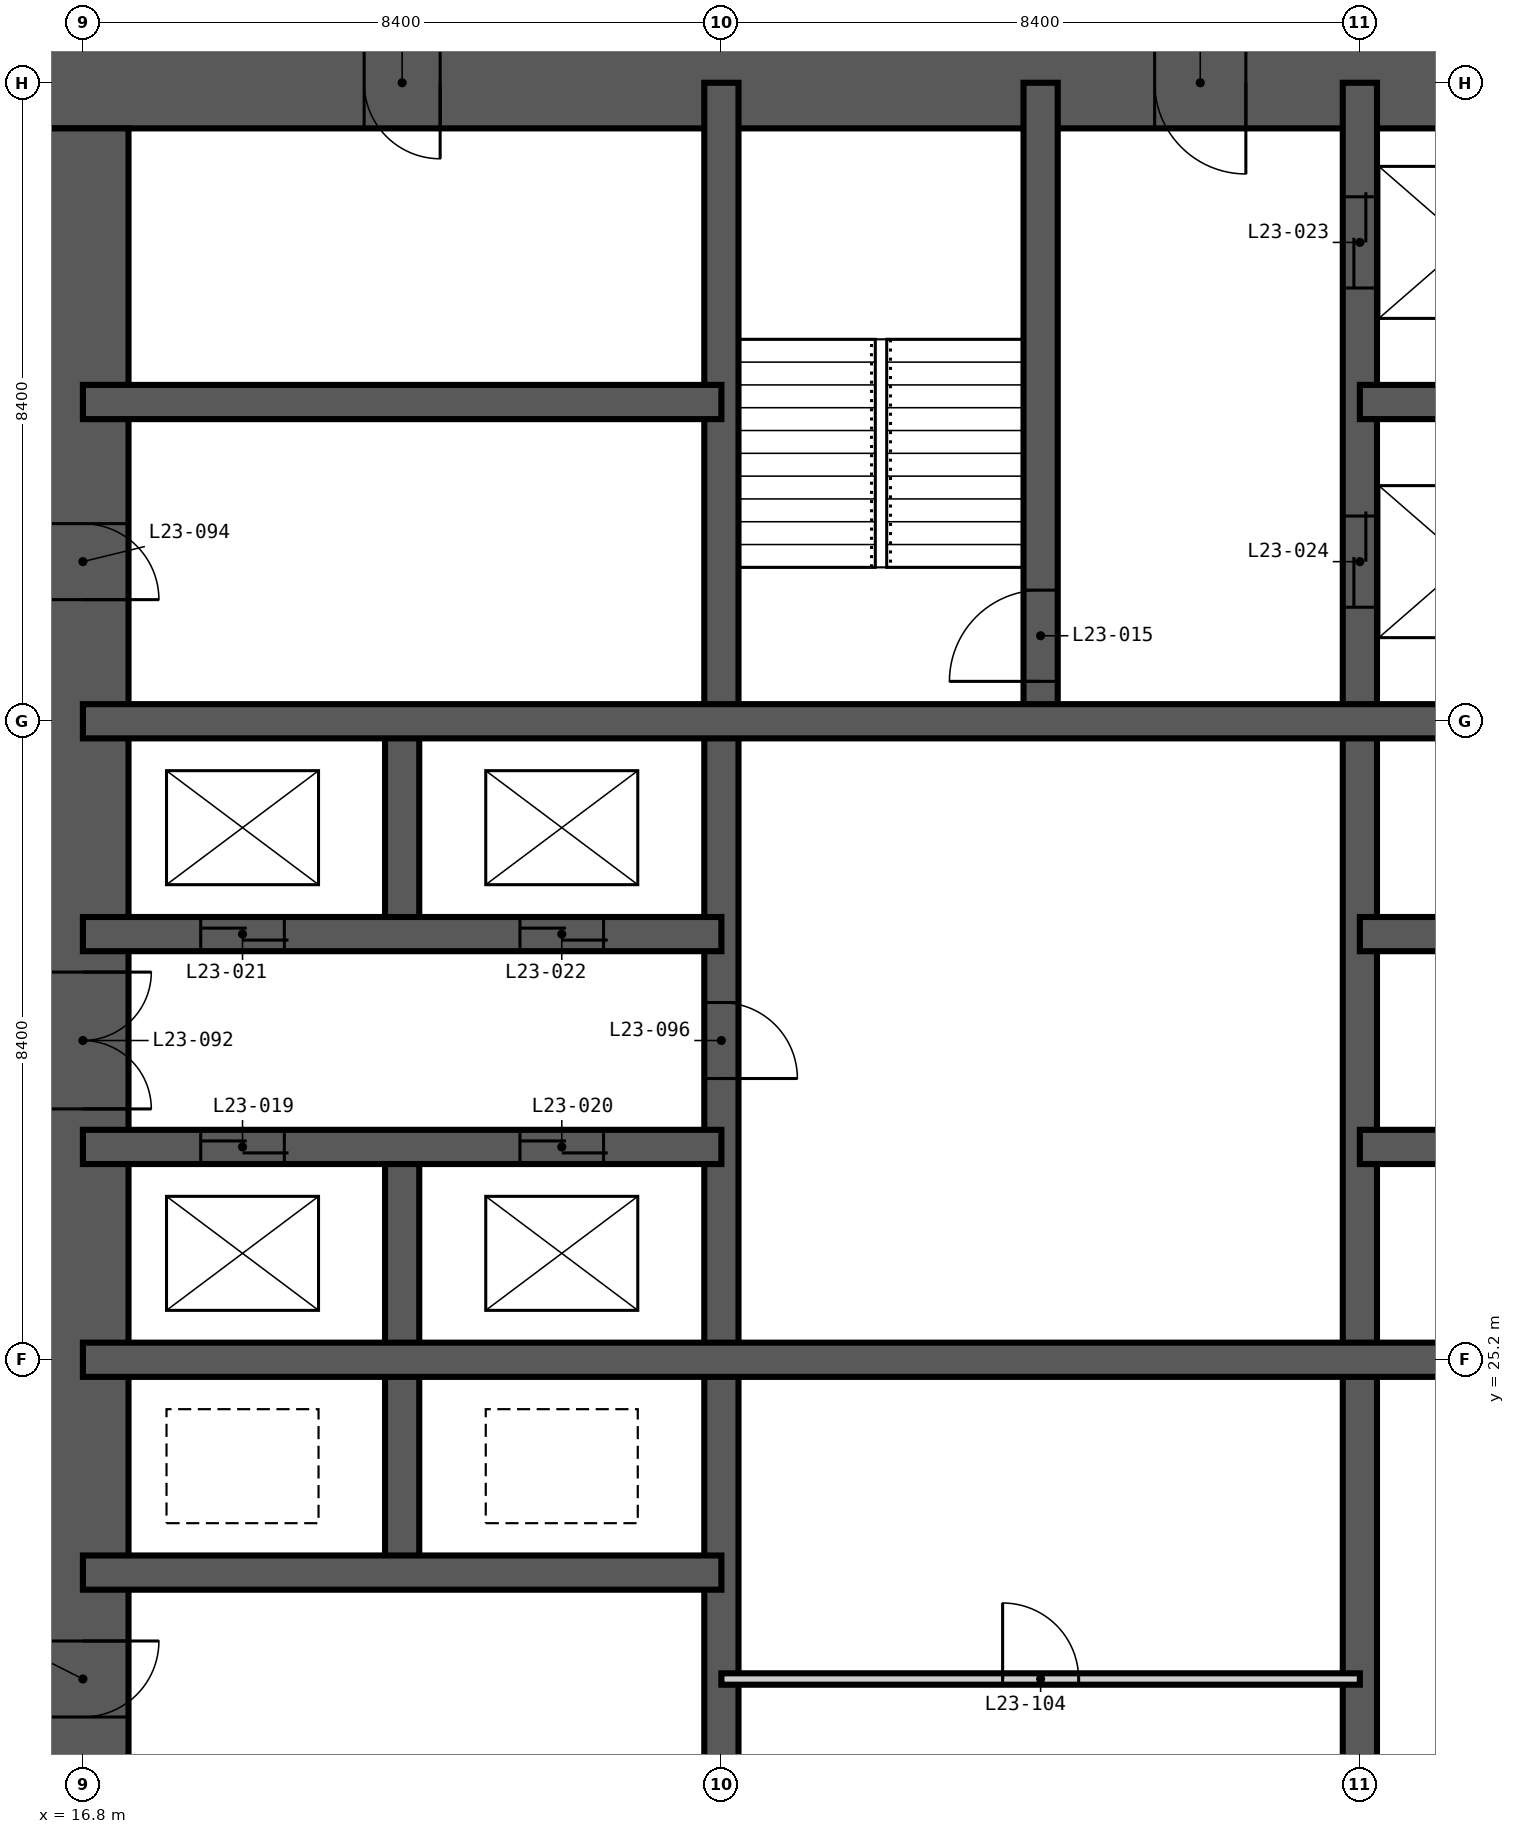
"""IFC4 building model, lengths in metres.
Left out: names, types, materials, properties, quantities, classifications, styles, units other than length and angle.
Written with IfcOpenShell. Run it as: python <this file> out.ifc"""

import sys

from ifc_helpers import new_model, si_unit, direction, frame, frame_2d, origin, place, context, subcontext, project, spatial, rectangle, extrude, element, fill, save


model = new_model("IFC4")
c1 = context("Model", 3, precision=1e-05, world=origin(), true_north=direction((0.0, 1.0)))
c2 = subcontext(c1, "Body", "Model", "MODEL_VIEW")
j1 = project(units=[si_unit("LENGTHUNIT", "METRE"), si_unit("PLANEANGLEUNIT", "RADIAN")], contexts=[c1])
p1 = place(None, origin())
s1 = spatial("IfcSite", under=j1, at=p1, CompositionType="ELEMENT")
p2 = place(p1, origin())
s2 = spatial("IfcBuilding", under=s1, at=p2, CompositionType="ELEMENT")
p3 = place(p2, frame((0.0, 0.0, 93.6)))
s3 = spatial("IfcBuildingStorey", under=s2, at=p3, CompositionType="ELEMENT", Elevation=93.6)
p4 = place(p3, frame((42.6, 42.0, -0.35), z_axis=(0.0, 0.0, 1.0), x_axis=(-1.0, 0.0, 0.0)))
e1 = element("IfcWall", 1, at=p4, inside=s3, PredefinedType="SHEAR", context=c2, shape_type="SweptSolid", body=[
    extrude(rectangle(XDim=26.4, YDim=1.2, at=frame_2d((13.2, 0.0))), origin(), (0.0, 0.0, 1.0), 3.6),
])
p5 = place(p4, frame((21.1, 0.0, 0.35)))
e2 = element("IfcOpeningElement", 2, at=p5, cuts=e1, PredefinedType="OPENING", context=c2, shape_type="SweptSolid", body=[
    extrude(rectangle(XDim=1.0, YDim=2.1, at=frame_2d((0.5, 1.05))), frame((0.0, 0.61, 0.0), z_axis=(0.0, -1.0, 0.0), x_axis=(1.0, 0.0, 0.0)), (0.0, 0.0, 1.0), 1.22),
])
p6 = place(p4, frame((10.5, 0.0, 0.35)))
e3 = element("IfcOpeningElement", 3, at=p6, cuts=e1, PredefinedType="OPENING", context=c2, shape_type="SweptSolid", body=[
    extrude(rectangle(XDim=1.2, YDim=2.2, at=frame_2d((0.6, 1.1))), frame((0.0, 0.61, 0.0), z_axis=(0.0, -1.0, 0.0), x_axis=(1.0, 0.0, 0.0)), (0.0, 0.0, 1.0), 1.22),
])
p7 = place(p3, frame((16.8, 41.4, -0.35), z_axis=(0.0, 0.0, 1.0), x_axis=(0.0, -1.0, 0.0)))
e4 = element("IfcWall", 4, at=p7, inside=s3, PredefinedType="SHEAR", context=c2, shape_type="SweptSolid", body=[
    extrude(rectangle(XDim=24.0, YDim=1.2, at=frame_2d((12.0, 0.0))), origin(), (0.0, 0.0, 1.0), 3.6),
])
p8 = place(p7, frame((11.1, 0.0, 0.35)))
e5 = element("IfcOpeningElement", 5, at=p8, cuts=e4, PredefinedType="OPENING", context=c2, shape_type="SweptSolid", body=[
    extrude(rectangle(XDim=1.8, YDim=2.2, at=frame_2d((0.9, 1.1))), frame((0.0, 0.61, 0.0), z_axis=(0.0, -1.0, 0.0), x_axis=(1.0, 0.0, 0.0)), (0.0, 0.0, 1.0), 1.22),
])
p9 = place(p7, frame((19.9, 0.0, 0.35)))
e6 = element("IfcOpeningElement", 6, at=p9, cuts=e4, PredefinedType="OPENING", context=c2, shape_type="SweptSolid", body=[
    extrude(rectangle(XDim=1.0, YDim=2.1, at=frame_2d((0.5, 1.05))), frame((0.0, 0.61, 0.0), z_axis=(0.0, -1.0, 0.0), x_axis=(1.0, 0.0, 0.0)), (0.0, 0.0, 1.0), 1.22),
])
p10 = place(p7, frame((5.2, 0.0, 0.35)))
e7 = element("IfcOpeningElement", 7, at=p10, cuts=e4, PredefinedType="OPENING", context=c2, shape_type="SweptSolid", body=[
    extrude(rectangle(XDim=1.0, YDim=2.1, at=frame_2d((0.5, 1.05))), frame((0.0, 0.61, 0.0), z_axis=(0.0, -1.0, 0.0), x_axis=(1.0, 0.0, 0.0)), (0.0, 0.0, 1.0), 1.22),
])
p11 = place(p3, frame((21.0, 22.4, -0.35), z_axis=(0.0, 0.0, 1.0), x_axis=(0.0, 1.0, 0.0)))
e8 = element("IfcWall", 8, at=p11, inside=s3, PredefinedType="SHEAR", context=c2, shape_type="SweptSolid", body=[
    extrude(rectangle(XDim=5.6, YDim=0.45, at=frame_2d((2.8, 0.0))), origin(), (0.0, 0.0, 1.0), 3.6),
])
p12 = place(p3, frame((21.0, 30.8, -0.35), z_axis=(0.0, 0.0, 1.0), x_axis=(0.0, 1.0, 0.0)))
e9 = element("IfcWall", 9, at=p12, inside=s3, PredefinedType="SHEAR", context=c2, shape_type="SweptSolid", body=[
    extrude(rectangle(XDim=2.8, YDim=0.45, at=frame_2d((1.4, 0.0))), origin(), (0.0, 0.0, 1.0), 3.6),
])
p13 = place(p3, frame((25.2, 16.8, -0.35), z_axis=(0.0, 0.0, 1.0), x_axis=(0.0, 1.0, 0.0)))
e10 = element("IfcWall", 10, at=p13, inside=s3, PredefinedType="SHEAR", context=c2, shape_type="SweptSolid", body=[
    extrude(rectangle(XDim=25.2, YDim=0.45, at=frame_2d((12.6, 0.0))), origin(), (0.0, 0.0, 1.0), 3.6),
])
p14 = place(p13, frame((12.1, 0.0, 0.35)))
e11 = element("IfcOpeningElement", 11, at=p14, cuts=e10, PredefinedType="OPENING", context=c2, shape_type="SweptSolid", body=[
    extrude(rectangle(XDim=1.0, YDim=2.1, at=frame_2d((0.5, 1.05))), frame((0.0, 0.235, 0.0), z_axis=(0.0, -1.0, 0.0), x_axis=(1.0, 0.0, 0.0)), (0.0, 0.0, 1.0), 0.47),
])
p15 = place(p3, frame((29.4, 33.6, -0.35), z_axis=(0.0, 0.0, 1.0), x_axis=(0.0, 1.0, 0.0)))
e12 = element("IfcWall", 12, at=p15, inside=s3, PredefinedType="SHEAR", context=c2, shape_type="SweptSolid", body=[
    extrude(rectangle(XDim=8.4, YDim=0.45, at=frame_2d((4.2, 0.0))), origin(), (0.0, 0.0, 1.0), 3.6),
])
p16 = place(p15, frame((0.525, 0.0, 0.35)))
e13 = element("IfcOpeningElement", 13, at=p16, cuts=e12, PredefinedType="OPENING", context=c2, shape_type="SweptSolid", body=[
    extrude(rectangle(XDim=1.2, YDim=2.2, at=frame_2d((0.6, 1.1))), frame((0.0, 0.235, 0.0), z_axis=(0.0, -1.0, 0.0), x_axis=(1.0, 0.0, 0.0)), (0.0, 0.0, 1.0), 0.47),
])
p17 = place(p3, frame((33.6, 16.8, -0.35), z_axis=(0.0, 0.0, 1.0), x_axis=(0.0, 1.0, 0.0)))
e14 = element("IfcWall", 14, at=p17, inside=s3, PredefinedType="SHEAR", context=c2, shape_type="SweptSolid", body=[
    extrude(rectangle(XDim=25.2, YDim=0.45, at=frame_2d((12.6, 0.0))), origin(), (0.0, 0.0, 1.0), 3.6),
])
p18 = place(p17, frame((22.5, 0.0, 0.35)))
e15 = element("IfcOpeningElement", 15, at=p18, cuts=e14, PredefinedType="OPENING", context=c2, shape_type="SweptSolid", body=[
    extrude(rectangle(XDim=1.2, YDim=2.2, at=frame_2d((0.6, 1.1))), frame((0.0, 0.235, 0.0), z_axis=(0.0, -1.0, 0.0), x_axis=(1.0, 0.0, 0.0)), (0.0, 0.0, 1.0), 0.47),
])
p19 = place(p17, frame((18.3, 0.0, 0.35)))
e16 = element("IfcOpeningElement", 16, at=p19, cuts=e14, PredefinedType="OPENING", context=c2, shape_type="SweptSolid", body=[
    extrude(rectangle(XDim=1.2, YDim=2.2, at=frame_2d((0.6, 1.1))), frame((0.0, 0.235, 0.0), z_axis=(0.0, -1.0, 0.0), x_axis=(1.0, 0.0, 0.0)), (0.0, 0.0, 1.0), 0.47),
])
p20 = place(p3, frame((16.8, 22.4, -0.35), z_axis=(0.0, 0.0, 1.0), x_axis=(1.0, 0.0, 0.0)))
e17 = element("IfcWall", 17, at=p20, inside=s3, PredefinedType="SHEAR", context=c2, shape_type="SweptSolid", body=[
    extrude(rectangle(XDim=8.4, YDim=0.45, at=frame_2d((4.2, 0.0))), origin(), (0.0, 0.0, 1.0), 3.6),
])
p21 = place(p3, frame((16.8, 25.2, -0.35), z_axis=(0.0, 0.0, 1.0), x_axis=(1.0, 0.0, 0.0)))
e18 = element("IfcWall", 18, at=p21, inside=s3, PredefinedType="SHEAR", context=c2, shape_type="SweptSolid", body=[
    extrude(rectangle(XDim=25.2, YDim=0.45, at=frame_2d((12.6, 0.0))), origin(), (0.0, 0.0, 1.0), 3.6),
])
p22 = place(p3, frame((16.8, 28.0, -0.35), z_axis=(0.0, 0.0, 1.0), x_axis=(1.0, 0.0, 0.0)))
e19 = element("IfcWall", 19, at=p22, inside=s3, PredefinedType="SHEAR", context=c2, shape_type="SweptSolid", body=[
    extrude(rectangle(XDim=8.4, YDim=0.45, at=frame_2d((4.2, 0.0))), origin(), (0.0, 0.0, 1.0), 3.6),
])
p23 = place(p22, frame((1.55, 0.0, 0.35)))
e20 = element("IfcOpeningElement", 20, at=p23, cuts=e19, PredefinedType="OPENING", context=c2, shape_type="SweptSolid", body=[
    extrude(rectangle(XDim=1.1, YDim=2.2, at=frame_2d((0.55, 1.1))), frame((0.0, 0.235, 0.0), z_axis=(0.0, -1.0, 0.0), x_axis=(1.0, 0.0, 0.0)), (0.0, 0.0, 1.0), 0.47),
])
p24 = place(p22, frame((5.75, 0.0, 0.35)))
e21 = element("IfcOpeningElement", 21, at=p24, cuts=e19, PredefinedType="OPENING", context=c2, shape_type="SweptSolid", body=[
    extrude(rectangle(XDim=1.1, YDim=2.2, at=frame_2d((0.55, 1.1))), frame((0.0, 0.235, 0.0), z_axis=(0.0, -1.0, 0.0), x_axis=(1.0, 0.0, 0.0)), (0.0, 0.0, 1.0), 0.47),
])
p25 = place(p3, frame((33.6, 28.0, -0.35), z_axis=(0.0, 0.0, 1.0), x_axis=(1.0, 0.0, 0.0)))
e22 = element("IfcWall", 22, at=p25, inside=s3, PredefinedType="SHEAR", context=c2, shape_type="SweptSolid", body=[
    extrude(rectangle(XDim=8.4, YDim=0.45, at=frame_2d((4.2, 0.0))), origin(), (0.0, 0.0, 1.0), 3.6),
])
p26 = place(p25, frame((1.55, 0.0, 0.35)))
e23 = element("IfcOpeningElement", 23, at=p26, cuts=e22, PredefinedType="OPENING", context=c2, shape_type="SweptSolid", body=[
    extrude(rectangle(XDim=1.1, YDim=2.2, at=frame_2d((0.55, 1.1))), frame((0.0, 0.235, 0.0), z_axis=(0.0, -1.0, 0.0), x_axis=(1.0, 0.0, 0.0)), (0.0, 0.0, 1.0), 0.47),
])
p27 = place(p25, frame((5.75, 0.0, 0.35)))
e24 = element("IfcOpeningElement", 24, at=p27, cuts=e22, PredefinedType="OPENING", context=c2, shape_type="SweptSolid", body=[
    extrude(rectangle(XDim=1.1, YDim=2.2, at=frame_2d((0.55, 1.1))), frame((0.0, 0.235, 0.0), z_axis=(0.0, -1.0, 0.0), x_axis=(1.0, 0.0, 0.0)), (0.0, 0.0, 1.0), 0.47),
])
p28 = place(p3, frame((16.8, 30.8, -0.35), z_axis=(0.0, 0.0, 1.0), x_axis=(1.0, 0.0, 0.0)))
e25 = element("IfcWall", 25, at=p28, inside=s3, PredefinedType="SHEAR", context=c2, shape_type="SweptSolid", body=[
    extrude(rectangle(XDim=8.4, YDim=0.45, at=frame_2d((4.2, 0.0))), origin(), (0.0, 0.0, 1.0), 3.6),
])
p29 = place(p28, frame((1.55, 0.0, 0.35)))
e26 = element("IfcOpeningElement", 26, at=p29, cuts=e25, PredefinedType="OPENING", context=c2, shape_type="SweptSolid", body=[
    extrude(rectangle(XDim=1.1, YDim=2.2, at=frame_2d((0.55, 1.1))), frame((0.0, 0.235, 0.0), z_axis=(0.0, -1.0, 0.0), x_axis=(1.0, 0.0, 0.0)), (0.0, 0.0, 1.0), 0.47),
])
p30 = place(p28, frame((5.75, 0.0, 0.35)))
e27 = element("IfcOpeningElement", 27, at=p30, cuts=e25, PredefinedType="OPENING", context=c2, shape_type="SweptSolid", body=[
    extrude(rectangle(XDim=1.1, YDim=2.2, at=frame_2d((0.55, 1.1))), frame((0.0, 0.235, 0.0), z_axis=(0.0, -1.0, 0.0), x_axis=(1.0, 0.0, 0.0)), (0.0, 0.0, 1.0), 0.47),
])
p31 = place(p3, frame((33.6, 30.8, -0.35), z_axis=(0.0, 0.0, 1.0), x_axis=(1.0, 0.0, 0.0)))
e28 = element("IfcWall", 28, at=p31, inside=s3, PredefinedType="SHEAR", context=c2, shape_type="SweptSolid", body=[
    extrude(rectangle(XDim=8.4, YDim=0.45, at=frame_2d((4.2, 0.0))), origin(), (0.0, 0.0, 1.0), 3.6),
])
p32 = place(p3, frame((16.8, 33.6, -0.35), z_axis=(0.0, 0.0, 1.0), x_axis=(1.0, 0.0, 0.0)))
e29 = element("IfcWall", 29, at=p32, inside=s3, PredefinedType="SHEAR", context=c2, shape_type="SweptSolid", body=[
    extrude(rectangle(XDim=25.2, YDim=0.45, at=frame_2d((12.6, 0.0))), origin(), (0.0, 0.0, 1.0), 3.6),
])
p33 = place(p32, frame((23.3, 0.0, 0.35)))
e30 = element("IfcOpeningElement", 30, at=p33, cuts=e29, PredefinedType="OPENING", context=c2, shape_type="SweptSolid", body=[
    extrude(rectangle(XDim=1.0, YDim=2.1, at=frame_2d((0.5, 1.05))), frame((0.0, 0.235, 0.0), z_axis=(0.0, -1.0, 0.0), x_axis=(1.0, 0.0, 0.0)), (0.0, 0.0, 1.0), 0.47),
])
p34 = place(p3, frame((16.8, 37.8, -0.35), z_axis=(0.0, 0.0, 1.0), x_axis=(1.0, 0.0, 0.0)))
e31 = element("IfcWall", 31, at=p34, inside=s3, PredefinedType="SHEAR", context=c2, shape_type="SweptSolid", body=[
    extrude(rectangle(XDim=8.4, YDim=0.45, at=frame_2d((4.2, 0.0))), origin(), (0.0, 0.0, 1.0), 3.6),
])
p35 = place(p3, frame((33.6, 37.8, -0.35), z_axis=(0.0, 0.0, 1.0), x_axis=(1.0, 0.0, 0.0)))
e32 = element("IfcWall", 32, at=p35, inside=s3, PredefinedType="SHEAR", context=c2, shape_type="SweptSolid", body=[
    extrude(rectangle(XDim=2.8, YDim=0.45, at=frame_2d((1.4, 0.0))), origin(), (0.0, 0.0, 1.0), 3.6),
])
p36 = place(p3, frame((25.2, 21.0, 0.0), z_axis=(0.0, 0.0, 1.0), x_axis=(1.0, 0.0, 0.0)))
e33 = element("IfcWall", 33, at=p36, inside=s3, PredefinedType="PARTITIONING", context=c2, shape_type="SweptSolid", body=[
    extrude(rectangle(XDim=8.4, YDim=0.15, at=frame_2d((4.2, 0.0))), origin(), (0.0, 0.0, 1.0), 3.25),
])
p37 = place(p36, frame((3.7, 0.0, 0.0)))
e34 = element("IfcOpeningElement", 34, at=p37, cuts=e33, PredefinedType="OPENING", context=c2, shape_type="SweptSolid", body=[
    extrude(rectangle(XDim=1.0, YDim=2.1, at=frame_2d((0.5, 1.05))), frame((0.0, 0.085, 0.0), z_axis=(0.0, -1.0, 0.0), x_axis=(1.0, 0.0, 0.0)), (0.0, 0.0, 1.0), 0.17),
])
p38 = place(p16, origin())
e35 = element("IfcDoor", 35, at=p38, inside=s3, OperationType="SINGLE_SWING_LEFT", PredefinedType="DOOR", context=c2, shape_type="SweptSolid", body=[
    extrude(rectangle(XDim=1.2, YDim=2.2, at=frame_2d((0.6, 1.1))), frame((0.0, 0.025, 0.0), z_axis=(0.0, -1.0, 0.0), x_axis=(1.0, 0.0, 0.0)), (0.0, 0.0, 1.0), 0.05),
])
fill(e13, e35)
p39 = place(p23, origin())
e36 = element("IfcDoor", 36, at=p39, inside=s3, OperationType="DOUBLE_DOOR_SLIDING", PredefinedType="DOOR", context=c2, shape_type="SweptSolid", body=[
    extrude(rectangle(XDim=1.1, YDim=2.2, at=frame_2d((0.55, 1.1))), frame((0.0, 0.025, 0.0), z_axis=(0.0, -1.0, 0.0), x_axis=(1.0, 0.0, 0.0)), (0.0, 0.0, 1.0), 0.05),
])
fill(e20, e36)
p40 = place(p24, origin())
e37 = element("IfcDoor", 37, at=p40, inside=s3, OperationType="DOUBLE_DOOR_SLIDING", PredefinedType="DOOR", context=c2, shape_type="SweptSolid", body=[
    extrude(rectangle(XDim=1.1, YDim=2.2, at=frame_2d((0.55, 1.1))), frame((0.0, 0.025, 0.0), z_axis=(0.0, -1.0, 0.0), x_axis=(1.0, 0.0, 0.0)), (0.0, 0.0, 1.0), 0.05),
])
fill(e21, e37)
p41 = place(p29, origin())
e38 = element("IfcDoor", 38, at=p41, inside=s3, OperationType="DOUBLE_DOOR_SLIDING", PredefinedType="DOOR", context=c2, shape_type="SweptSolid", body=[
    extrude(rectangle(XDim=1.1, YDim=2.2, at=frame_2d((0.55, 1.1))), frame((0.0, 0.025, 0.0), z_axis=(0.0, -1.0, 0.0), x_axis=(1.0, 0.0, 0.0)), (0.0, 0.0, 1.0), 0.05),
])
fill(e26, e38)
p42 = place(p30, origin())
e39 = element("IfcDoor", 39, at=p42, inside=s3, OperationType="DOUBLE_DOOR_SLIDING", PredefinedType="DOOR", context=c2, shape_type="SweptSolid", body=[
    extrude(rectangle(XDim=1.1, YDim=2.2, at=frame_2d((0.55, 1.1))), frame((0.0, 0.025, 0.0), z_axis=(0.0, -1.0, 0.0), x_axis=(1.0, 0.0, 0.0)), (0.0, 0.0, 1.0), 0.05),
])
fill(e27, e39)
p43 = place(p18, origin())
e40 = element("IfcDoor", 40, at=p43, inside=s3, OperationType="DOUBLE_DOOR_SLIDING", PredefinedType="DOOR", context=c2, shape_type="SweptSolid", body=[
    extrude(rectangle(XDim=1.2, YDim=2.2, at=frame_2d((0.6, 1.1))), frame((0.0, 0.025, 0.0), z_axis=(0.0, -1.0, 0.0), x_axis=(1.0, 0.0, 0.0)), (0.0, 0.0, 1.0), 0.05),
])
fill(e15, e40)
p44 = place(p19, origin())
e41 = element("IfcDoor", 41, at=p44, inside=s3, OperationType="DOUBLE_DOOR_SLIDING", PredefinedType="DOOR", context=c2, shape_type="SweptSolid", body=[
    extrude(rectangle(XDim=1.2, YDim=2.2, at=frame_2d((0.6, 1.1))), frame((0.0, 0.025, 0.0), z_axis=(0.0, -1.0, 0.0), x_axis=(1.0, 0.0, 0.0)), (0.0, 0.0, 1.0), 0.05),
])
fill(e16, e41)
p45 = place(p8, origin())
e42 = element("IfcDoor", 42, at=p45, inside=s3, OperationType="DOUBLE_DOOR_DOUBLE_SWING", PredefinedType="DOOR", context=c2, shape_type="SweptSolid", body=[
    extrude(rectangle(XDim=1.8, YDim=2.2, at=frame_2d((0.9, 1.1))), frame((0.0, 0.025, 0.0), z_axis=(0.0, -1.0, 0.0), x_axis=(1.0, 0.0, 0.0)), (0.0, 0.0, 1.0), 0.05),
])
fill(e5, e42)
p46 = place(p9, origin())
e43 = element("IfcDoor", 43, at=p46, inside=s3, OperationType="SINGLE_SWING_LEFT", PredefinedType="DOOR", context=c2, shape_type="SweptSolid", body=[
    extrude(rectangle(XDim=1.0, YDim=2.1, at=frame_2d((0.5, 1.05))), frame((0.0, 0.025, 0.0), z_axis=(0.0, -1.0, 0.0), x_axis=(1.0, 0.0, 0.0)), (0.0, 0.0, 1.0), 0.05),
])
fill(e6, e43)
p47 = place(p10, origin())
e44 = element("IfcDoor", 44, at=p47, inside=s3, OperationType="SINGLE_SWING_RIGHT", PredefinedType="DOOR", context=c2, shape_type="SweptSolid", body=[
    extrude(rectangle(XDim=1.0, YDim=2.1, at=frame_2d((0.5, 1.05))), frame((0.0, 0.025, 0.0), z_axis=(0.0, -1.0, 0.0), x_axis=(1.0, 0.0, 0.0)), (0.0, 0.0, 1.0), 0.05),
])
fill(e7, e44)
p48 = place(p5, origin())
e45 = element("IfcDoor", 45, at=p48, inside=s3, OperationType="SINGLE_SWING_LEFT", PredefinedType="DOOR", context=c2, shape_type="SweptSolid", body=[
    extrude(rectangle(XDim=1.0, YDim=2.1, at=frame_2d((0.5, 1.05))), frame((0.0, 0.025, 0.0), z_axis=(0.0, -1.0, 0.0), x_axis=(1.0, 0.0, 0.0)), (0.0, 0.0, 1.0), 0.05),
])
fill(e2, e45)
p49 = place(p14, frame((1.0, 0.0, 0.0), z_axis=(0.0, 0.0, 1.0), x_axis=(-1.0, 0.0, 0.0)))
e46 = element("IfcDoor", 46, at=p49, inside=s3, OperationType="SINGLE_SWING_RIGHT", PredefinedType="DOOR", context=c2, shape_type="SweptSolid", body=[
    extrude(rectangle(XDim=1.0, YDim=2.1, at=frame_2d((0.5, 1.05))), frame((0.0, 0.025, 0.0), z_axis=(0.0, -1.0, 0.0), x_axis=(1.0, 0.0, 0.0)), (0.0, 0.0, 1.0), 0.05),
])
fill(e11, e46)
p50 = place(p6, origin())
e47 = element("IfcDoor", 47, at=p50, inside=s3, OperationType="SINGLE_SWING_LEFT", PredefinedType="DOOR", context=c2, shape_type="SweptSolid", body=[
    extrude(rectangle(XDim=1.2, YDim=2.2, at=frame_2d((0.6, 1.1))), frame((0.0, 0.025, 0.0), z_axis=(0.0, -1.0, 0.0), x_axis=(1.0, 0.0, 0.0)), (0.0, 0.0, 1.0), 0.05),
])
fill(e3, e47)
p51 = place(p37, origin())
e48 = element("IfcDoor", 48, at=p51, inside=s3, OperationType="SINGLE_SWING_LEFT", PredefinedType="DOOR", context=c2, shape_type="SweptSolid", body=[
    extrude(rectangle(XDim=1.0, YDim=2.1, at=frame_2d((0.5, 1.05))), frame((0.0, 0.025, 0.0), z_axis=(0.0, -1.0, 0.0), x_axis=(1.0, 0.0, 0.0)), (0.0, 0.0, 1.0), 0.05),
])
fill(e34, e48)
save(model, sys.argv[1])
